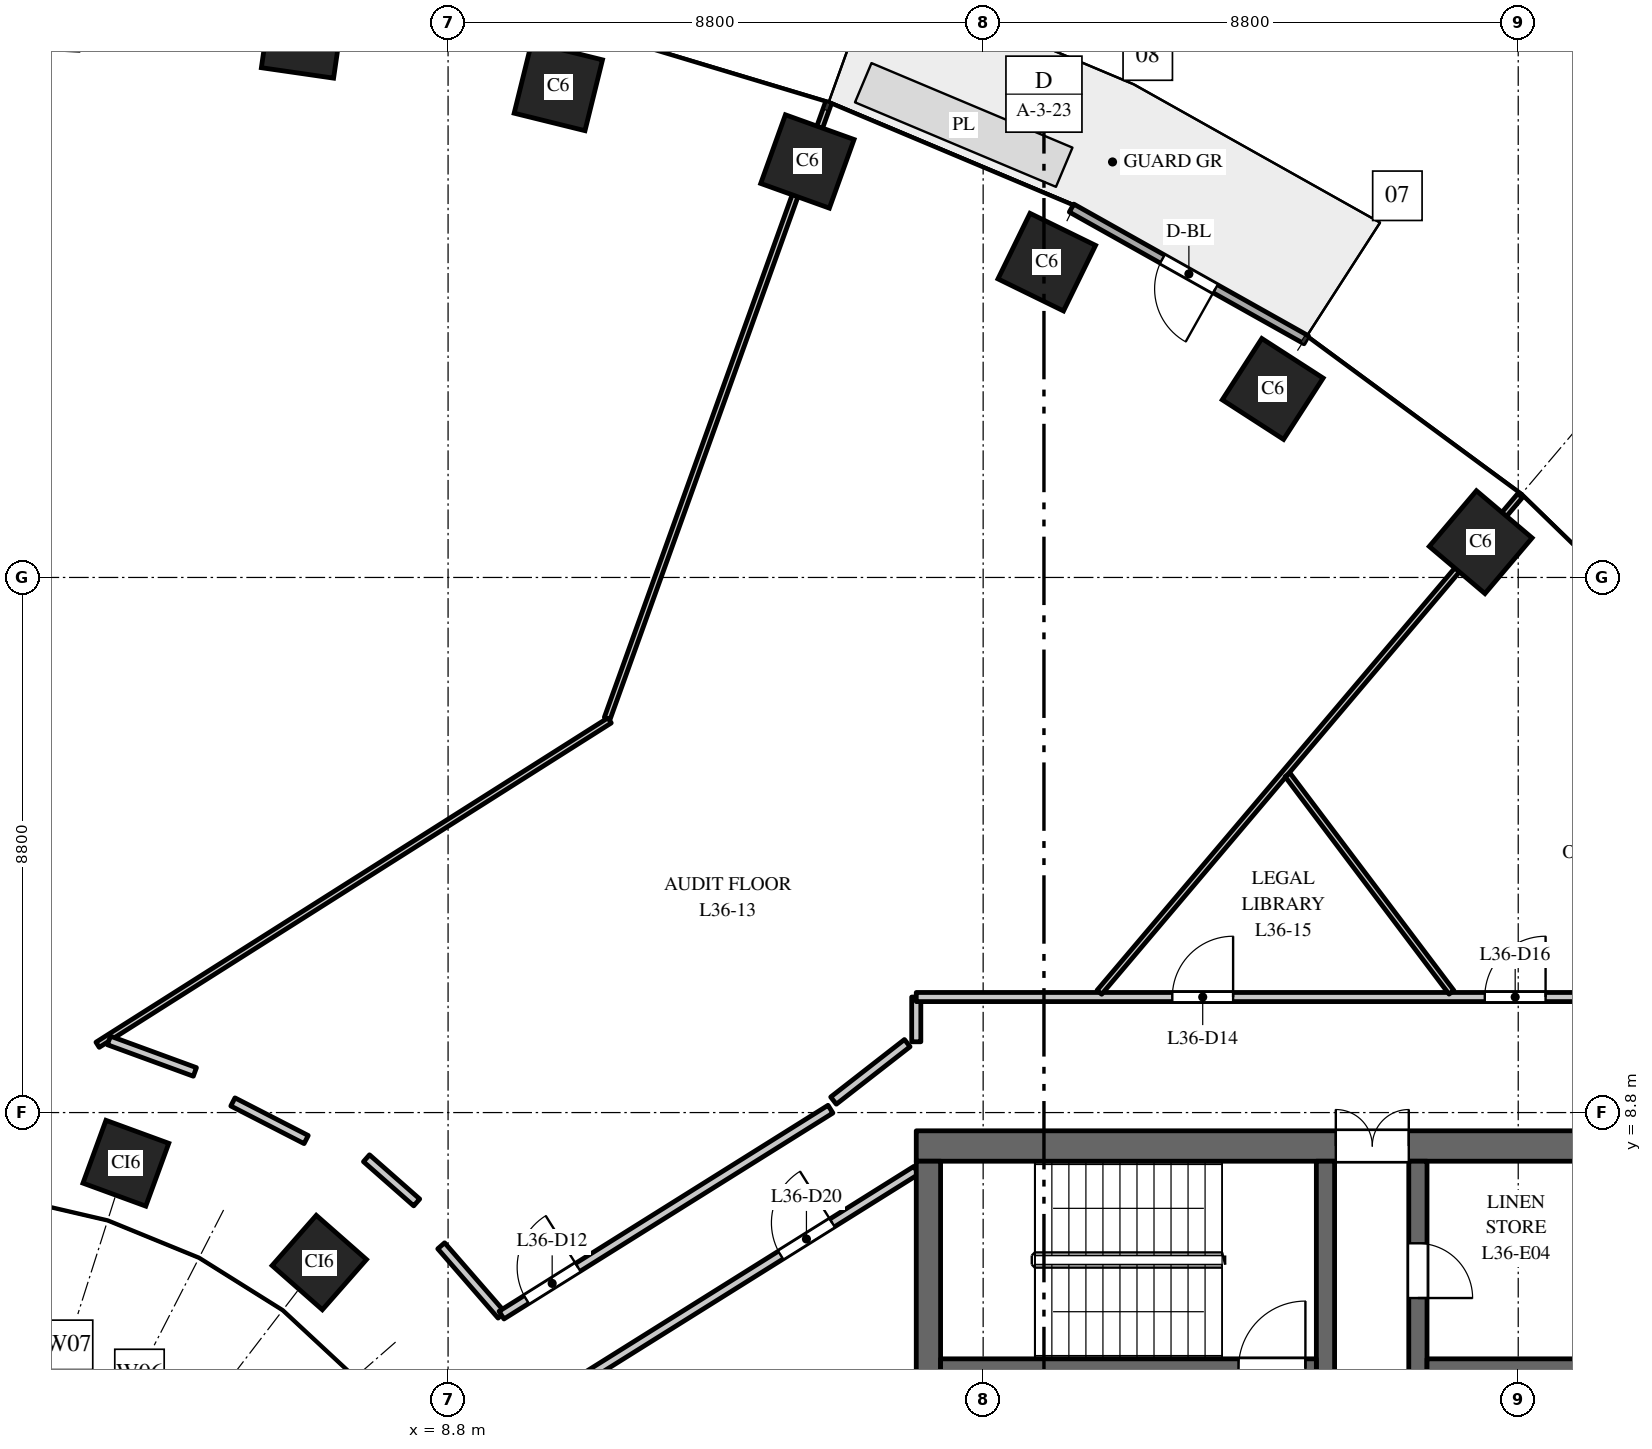
"""IFC4 building model, lengths in metres.
Left out: names, types, materials, properties, quantities, classifications, styles, units other than length and angle.
Written with IfcOpenShell. Run it as: python <this file> out.ifc"""

import sys

from ifc_helpers import new_model, si_unit, direction, frame, frame_2d, origin, origin_2d, place, context, subcontext, project, spatial, rectangle, extrude, element, fill, save


model = new_model("IFC4")
c1 = context("Model", 3, precision=1e-05, world=origin(), true_north=direction((0.0, 1.0)))
c2 = subcontext(c1, "Body", "Model", "MODEL_VIEW")
j1 = project(units=[si_unit("LENGTHUNIT", "METRE"), si_unit("PLANEANGLEUNIT", "RADIAN")], contexts=[c1])
p1 = place(None, origin())
s1 = spatial("IfcSite", under=j1, at=p1, CompositionType="ELEMENT")
p2 = place(p1, origin())
s2 = spatial("IfcBuilding", under=s1, at=p2, CompositionType="ELEMENT")
p3 = place(p2, frame((0.0, 0.0, 158.0)))
s3 = spatial("IfcBuildingStorey", under=s2, at=p3, CompositionType="ELEMENT", Elevation=158.0)
for number, where, z_axis, x_axis in (
    (1, (25.783, 18.18, 0.0), (0.0, 0.0, 1.0), (-0.763, 0.646, 0.0)),
    (2, (22.362, 20.7, 0.0), (0.0, 0.0, 1.0), (-0.84, 0.542, 0.0)),
    (3, (18.646, 22.785, 0.0), (0.0, 0.0, 1.0), (-0.898, 0.439, 0.0)),
    (4, (14.709, 24.441, 0.0), (0.0, 0.0, 1.0), (-0.941, 0.338, 0.0)),
    (5, (10.613, 25.674, 0.0), (0.0, 0.0, 1.0), (-0.971, 0.24, 0.0)),
    (6, (6.409, 26.491, 0.0), (0.0, 0.0, 1.0), (-0.99, 0.143, 0.0)),
):
    element("IfcColumn", number, at=place(p3, frame(where, z_axis=z_axis, x_axis=x_axis)), inside=s3, PredefinedType="COLUMN", context=c2, shape_type="SweptSolid", body=[
        extrude(rectangle(XDim=1.2, YDim=1.2, at=origin_2d()), origin(), (0.0, 0.0, 1.0), 4.0),
    ])
for number, where, z_axis, x_axis in (
    (7, (6.682, 6.334, 0.0), (0.0, 0.0, 1.0), (-0.751, 0.66, 0.0)),
    (8, (3.501, 7.967, 0.0), (0.0, 0.0, 1.0), (-0.939, 0.344, 0.0)),
):
    element("IfcColumn", number, at=place(p3, frame(where, z_axis=z_axis, x_axis=x_axis)), inside=s3, PredefinedType="COLUMN", context=c2, shape_type="SweptSolid", body=[
        extrude(rectangle(XDim=1.1, YDim=1.1, at=origin_2d()), origin(), (0.0, 0.0, 1.0), 4.0),
    ])
p4 = place(p3, frame((16.5, 8.25, 0.0), z_axis=(0.0, 0.0, 1.0), x_axis=(1.0, 0.0, 0.0)))
e9 = element("IfcWall", 9, at=p4, inside=s3, PredefinedType="SHEAR", context=c2, shape_type="SweptSolid", body=[
    extrude(rectangle(XDim=15.0, YDim=0.5, at=frame_2d((7.5, 0.0))), origin(), (0.0, 0.0, 1.0), 3.7),
])
p5 = place(p4, frame((6.9, 0.0, 0.0)))
e10 = element("IfcOpeningElement", 10, at=p5, cuts=e9, PredefinedType="OPENING", context=c2, shape_type="SweptSolid", body=[
    extrude(rectangle(XDim=1.2, YDim=2.1, at=frame_2d((0.6, 1.05))), frame((0.0, 0.26, 0.0), z_axis=(0.0, -1.0, 0.0), x_axis=(1.0, 0.0, 0.0)), (0.0, 0.0, 1.0), 0.52),
])
p6 = place(p4, frame((12.425, 0.0, 0.0)))
e11 = element("IfcOpeningElement", 11, at=p6, cuts=e9, PredefinedType="OPENING", context=c2, shape_type="SweptSolid", body=[
    extrude(rectangle(XDim=0.9, YDim=2.1, at=frame_2d((0.45, 1.05))), frame((0.0, 0.26, 0.0), z_axis=(0.0, -1.0, 0.0), x_axis=(1.0, 0.0, 0.0)), (0.0, 0.0, 1.0), 0.52),
])
p7 = place(p3, frame((24.75, -8.0, 0.0), z_axis=(0.0, 0.0, 1.0), x_axis=(0.0, 1.0, 0.0)))
e12 = element("IfcWall", 12, at=p7, inside=s3, PredefinedType="SHEAR", context=c2, shape_type="SweptSolid", body=[
    extrude(rectangle(XDim=16.0, YDim=0.3, at=frame_2d((8.0, 0.0))), origin(), (0.0, 0.0, 1.0), 3.7),
])
p8 = place(p7, frame((4.425, 0.0, 0.0)))
e13 = element("IfcOpeningElement", 13, at=p8, cuts=e12, PredefinedType="OPENING", context=c2, shape_type="SweptSolid", body=[
    extrude(rectangle(XDim=1.1, YDim=2.1, at=frame_2d((0.55, 1.05))), frame((0.0, 0.16, 0.0), z_axis=(0.0, -1.0, 0.0), x_axis=(1.0, 0.0, 0.0)), (0.0, 0.0, 1.0), 0.32),
])
p9 = place(p7, frame((7.45, 0.0, 0.0)))
e14 = element("IfcOpeningElement", 14, at=p9, cuts=e12, PredefinedType="OPENING", context=c2, shape_type="SweptSolid", body=[
    extrude(rectangle(XDim=1.1, YDim=2.1, at=frame_2d((0.55, 1.05))), frame((0.0, 0.16, 0.0), z_axis=(0.0, -1.0, 0.0), x_axis=(1.0, 0.0, 0.0)), (0.0, 0.0, 1.0), 0.32),
])
p10 = place(p7, frame((10.475, 0.0, 0.0)))
e15 = element("IfcOpeningElement", 15, at=p10, cuts=e12, PredefinedType="OPENING", context=c2, shape_type="SweptSolid", body=[
    extrude(rectangle(XDim=1.1, YDim=2.1, at=frame_2d((0.55, 1.05))), frame((0.0, 0.16, 0.0), z_axis=(0.0, -1.0, 0.0), x_axis=(1.0, 0.0, 0.0)), (0.0, 0.0, 1.0), 0.32),
])
p11 = place(p7, frame((13.75, 0.0, 0.0)))
e16 = element("IfcOpeningElement", 16, at=p11, cuts=e12, PredefinedType="OPENING", context=c2, shape_type="SweptSolid", body=[
    extrude(rectangle(XDim=0.9, YDim=2.1, at=frame_2d((0.45, 1.05))), frame((0.0, 0.16, 0.0), z_axis=(0.0, -1.0, 0.0), x_axis=(1.0, 0.0, 0.0)), (0.0, 0.0, 1.0), 0.32),
])
p12 = place(p7, frame((1.35, 0.0, 0.0)))
e17 = element("IfcOpeningElement", 17, at=p12, cuts=e12, PredefinedType="OPENING", context=c2, shape_type="SweptSolid", body=[
    extrude(rectangle(XDim=0.9, YDim=2.1, at=frame_2d((0.45, 1.05))), frame((0.0, 0.16, 0.0), z_axis=(0.0, -1.0, 0.0), x_axis=(1.0, 0.0, 0.0)), (0.0, 0.0, 1.0), 0.32),
])
p13 = place(p3, frame((16.7, -8.0, 0.0), z_axis=(0.0, 0.0, 1.0), x_axis=(0.0, 1.0, 0.0)))
e18 = element("IfcWall", 18, at=p13, inside=s3, PredefinedType="SHEAR", context=c2, shape_type="SweptSolid", body=[
    extrude(rectangle(XDim=16.0, YDim=0.4, at=frame_2d((8.0, 0.0))), origin(), (0.0, 0.0, 1.0), 3.7),
])
p14 = place(p3, frame((24.9, 4.6, 0.0), z_axis=(0.0, 0.0, 1.0), x_axis=(1.0, 0.0, 0.0)))
e19 = element("IfcWall", 19, at=p14, inside=s3, PredefinedType="SHEAR", context=c2, shape_type="SweptSolid", body=[
    extrude(rectangle(XDim=6.1, YDim=0.3, at=frame_2d((3.05, 0.0))), origin(), (0.0, 0.0, 1.0), 3.7),
])
p15 = place(p14, frame((4.2, 0.0, 0.0)))
e20 = element("IfcOpeningElement", 20, at=p15, cuts=e19, PredefinedType="OPENING", context=c2, shape_type="SweptSolid", body=[
    extrude(rectangle(XDim=0.9, YDim=2.1, at=frame_2d((0.45, 1.05))), frame((0.0, 0.16, 0.0), z_axis=(0.0, -1.0, 0.0), x_axis=(1.0, 0.0, 0.0)), (0.0, 0.0, 1.0), 0.32),
])
p16 = place(p3, frame((23.23, 2.25, 0.0), z_axis=(0.0, 0.0, 1.0), x_axis=(0.0, 1.0, 0.0)))
e21 = element("IfcWall", 21, at=p16, inside=s3, PredefinedType="SHEAR", context=c2, shape_type="SweptSolid", body=[
    extrude(rectangle(XDim=5.75, YDim=0.3, at=frame_2d((2.875, 0.0))), origin(), (0.0, 0.0, 1.0), 3.7),
])
p17 = place(p16, frame((0.6, 0.0, 0.0)))
e22 = element("IfcOpeningElement", 22, at=p17, cuts=e21, PredefinedType="OPENING", context=c2, shape_type="SweptSolid", body=[
    extrude(rectangle(XDim=1.0, YDim=2.1, at=frame_2d((0.5, 1.05))), frame((0.0, 0.16, 0.0), z_axis=(0.0, -1.0, 0.0), x_axis=(1.0, 0.0, 0.0)), (0.0, 0.0, 1.0), 0.32),
])
p18 = place(p3, frame((16.9, 4.6, 0.0), z_axis=(0.0, 0.0, 1.0), x_axis=(1.0, 0.0, 0.0)))
e23 = element("IfcWall", 23, at=p18, inside=s3, PredefinedType="SHEAR", context=c2, shape_type="SweptSolid", body=[
    extrude(rectangle(XDim=6.18, YDim=0.3, at=frame_2d((3.09, 0.0))), origin(), (0.0, 0.0, 1.0), 3.7),
])
p19 = place(p18, frame((4.9, 0.0, 0.0)))
e24 = element("IfcOpeningElement", 24, at=p19, cuts=e23, PredefinedType="OPENING", context=c2, shape_type="SweptSolid", body=[
    extrude(rectangle(XDim=1.1, YDim=2.1, at=frame_2d((0.55, 1.05))), frame((0.0, 0.16, 0.0), z_axis=(0.0, -1.0, 0.0), x_axis=(1.0, 0.0, 0.0)), (0.0, 0.0, 1.0), 0.32),
])
p20 = place(p3, frame((22.913, 21.509, 0.0), z_axis=(0.0, 0.0, 1.0), x_axis=(-0.872046572975, 0.489422899509, 0.0)))
e25 = element("IfcWall", 25, at=p20, inside=s3, PredefinedType="STANDARD", context=c2, shape_type="SweptSolid", body=[
    extrude(rectangle(XDim=4.426, YDim=0.15, at=frame_2d((2.213, 0.0))), origin(), (0.0, 0.0, 1.0), 3.7),
])
p21 = place(p20, frame((1.713, 0.0, 0.0)))
e26 = element("IfcOpeningElement", 26, at=p21, cuts=e25, PredefinedType="OPENING", context=c2, shape_type="SweptSolid", body=[
    extrude(rectangle(XDim=1.0, YDim=2.4, at=frame_2d((0.5, 1.2))), frame((0.0, 0.085, 0.0), z_axis=(0.0, -1.0, 0.0), x_axis=(1.0, 0.0, 0.0)), (0.0, 0.0, 1.0), 0.17),
])
p22 = place(p3, frame((3.036, 9.915, 0.0), z_axis=(0.0, 0.0, 1.0), x_axis=(0.844792135558, 0.535094615652, 0.0)))
e27 = element("IfcWall", 27, at=p22, inside=s3, PredefinedType="PARTITIONING", context=c2, shape_type="SweptSolid", body=[
    extrude(rectangle(XDim=9.968, YDim=0.1, at=frame_2d((4.984, 0.0))), origin(), (0.0, 0.0, 1.0), 2.85),
])
p23 = place(p3, frame((3.222, 9.986, 0.0), z_axis=(0.0, 0.0, 1.0), x_axis=(0.938967105432, -0.344006940215, 0.0)))
e28 = element("IfcWall", 28, at=p23, inside=s3, PredefinedType="PARTITIONING", context=c2, shape_type="SweptSolid", body=[
    extrude(rectangle(XDim=1.506, YDim=0.15, at=frame_2d((0.753, 0.0))), origin(), (0.0, 0.0, 1.0), 3.7),
])
p24 = place(p3, frame((5.261, 8.975, 0.0), z_axis=(0.0, 0.0, 1.0), x_axis=(0.889472002788, -0.456989667559, 0.0)))
e29 = element("IfcWall", 29, at=p24, inside=s3, PredefinedType="PARTITIONING", context=c2, shape_type="SweptSolid", body=[
    extrude(rectangle(XDim=1.355, YDim=0.15, at=frame_2d((0.677, 0.0))), origin(), (0.0, 0.0, 1.0), 2.85),
])
p25 = place(p3, frame((7.458, 8.049, 0.0), z_axis=(0.0, 0.0, 1.0), x_axis=(0.75060787095, -0.660747927782, 0.0)))
e30 = element("IfcWall", 30, at=p25, inside=s3, PredefinedType="PARTITIONING", context=c2, shape_type="SweptSolid", body=[
    extrude(rectangle(XDim=1.1, YDim=0.15, at=frame_2d((0.55, 0.0))), origin(), (0.0, 0.0, 1.0), 3.7),
])
p26 = place(p3, frame((8.687, 6.609, 0.0), z_axis=(0.0, 0.0, 1.0), x_axis=(0.656454677423, -0.75436546613, 0.0)))
e31 = element("IfcWall", 31, at=p26, inside=s3, PredefinedType="PARTITIONING", context=c2, shape_type="SweptSolid", body=[
    extrude(rectangle(XDim=1.511, YDim=0.15, at=frame_2d((0.755, 0.0))), origin(), (0.0, 0.0, 1.0), 3.7),
])
p27 = place(p3, frame((9.679, 5.469, 0.0), z_axis=(0.0, 0.0, 1.0), x_axis=(0.847602682855, 0.530631408811, 0.0)))
e32 = element("IfcWall", 32, at=p27, inside=s3, PredefinedType="PARTITIONING", context=c2, shape_type="SweptSolid", body=[
    extrude(rectangle(XDim=6.383, YDim=0.15, at=frame_2d((3.191, 0.0))), origin(), (0.0, 0.0, 1.0), 3.7),
])
p28 = place(p27, frame((0.483, 0.0, 0.0)))
e33 = element("IfcOpeningElement", 33, at=p28, cuts=e32, PredefinedType="OPENING", context=c2, shape_type="SweptSolid", body=[
    extrude(rectangle(XDim=1.0, YDim=2.1, at=frame_2d((0.5, 1.05))), frame((0.0, 0.085, 0.0), z_axis=(0.0, -1.0, 0.0), x_axis=(1.0, 0.0, 0.0)), (0.0, 0.0, 1.0), 0.17),
])
p29 = place(p3, frame((10.752, 4.254, 0.0), z_axis=(0.0, 0.0, 1.0), x_axis=(0.847690706888, 0.530490777917, 0.0)))
e34 = element("IfcWall", 34, at=p29, inside=s3, PredefinedType="PARTITIONING", context=c2, shape_type="SweptSolid", body=[
    extrude(rectangle(XDim=6.781, YDim=0.15, at=frame_2d((3.39, 0.0))), origin(), (0.0, 0.0, 1.0), 3.7),
])
p30 = place(p29, frame((4.15, 0.0, 0.0)))
e35 = element("IfcOpeningElement", 35, at=p30, cuts=e34, PredefinedType="OPENING", context=c2, shape_type="SweptSolid", body=[
    extrude(rectangle(XDim=1.0, YDim=2.1, at=frame_2d((0.5, 1.05))), frame((0.0, 0.085, 0.0), z_axis=(0.0, -1.0, 0.0), x_axis=(1.0, 0.0, 0.0)), (0.0, 0.0, 1.0), 0.17),
])
p31 = place(p3, frame((11.417, 15.282, 0.0), z_axis=(0.0, 0.0, 1.0), x_axis=(0.338283704349, 0.941044172912, 0.0)))
e36 = element("IfcWall", 36, at=p31, inside=s3, PredefinedType="PARTITIONING", context=c2, shape_type="SweptSolid", body=[
    extrude(rectangle(XDim=10.734, YDim=0.1, at=frame_2d((5.367, 0.0))), origin(), (0.0, 0.0, 1.0), 2.85),
])
p32 = place(p3, frame((16.5, 9.964, 0.0), z_axis=(0.0, 0.0, 1.0), x_axis=(0.0, 1.0, 0.0)))
e37 = element("IfcWall", 37, at=p32, inside=s3, PredefinedType="PARTITIONING", context=c2, shape_type="SweptSolid", body=[
    extrude(rectangle(XDim=0.736, YDim=0.15, at=frame_2d((0.368, 0.0))), origin(), (0.0, 0.0, 1.0), 3.7),
])
p33 = place(p3, frame((16.5, 10.7, 0.0), z_axis=(0.0, 0.0, 1.0), x_axis=(1.0, 0.0, 0.0)))
e38 = element("IfcWall", 38, at=p33, inside=s3, PredefinedType="PARTITIONING", context=c2, shape_type="SweptSolid", body=[
    extrude(rectangle(XDim=15.0, YDim=0.15, at=frame_2d((7.5, 0.0))), origin(), (0.0, 0.0, 1.0), 2.75),
])
p34 = place(p33, frame((4.211, 0.0, 0.0)))
e39 = element("IfcOpeningElement", 39, at=p34, cuts=e38, PredefinedType="OPENING", context=c2, shape_type="SweptSolid", body=[
    extrude(rectangle(XDim=1.0, YDim=2.1, at=frame_2d((0.5, 1.05))), frame((0.0, 0.085, 0.0), z_axis=(0.0, -1.0, 0.0), x_axis=(1.0, 0.0, 0.0)), (0.0, 0.0, 1.0), 0.17),
])
p35 = place(p33, frame((9.35, 0.0, 0.0)))
e40 = element("IfcOpeningElement", 40, at=p35, cuts=e38, PredefinedType="OPENING", context=c2, shape_type="SweptSolid", body=[
    extrude(rectangle(XDim=1.0, YDim=2.1, at=frame_2d((0.5, 1.05))), frame((0.0, 0.085, 0.0), z_axis=(0.0, -1.0, 0.0), x_axis=(1.0, 0.0, 0.0)), (0.0, 0.0, 1.0), 0.17),
])
p36 = place(p3, frame((19.511, 10.778, 0.0), z_axis=(0.0, 0.0, 1.0), x_axis=(0.646400187952, 0.762998556365, 0.0)))
e41 = element("IfcWall", 41, at=p36, inside=s3, PredefinedType="PARTITIONING", context=c2, shape_type="SweptSolid", body=[
    extrude(rectangle(XDim=10.704, YDim=0.1, at=frame_2d((5.352, 0.0))), origin(), (0.0, 0.0, 1.0), 2.9),
])
p37 = place(p3, frame((22.606, 14.354, 0.0), z_axis=(0.0, 0.0, 1.0), x_axis=(0.602012984229, -0.798486297202, 0.0)))
e42 = element("IfcWall", 42, at=p37, inside=s3, PredefinedType="PARTITIONING", context=c2, shape_type="SweptSolid", body=[
    extrude(rectangle(XDim=4.478, YDim=0.1, at=frame_2d((2.239, 0.0))), origin(), (0.0, 0.0, 1.0), 2.75),
])
p38 = place(p3, frame((15.139, 8.997, 0.0), z_axis=(0.0, 0.0, 1.0), x_axis=(0.788950226826, 0.614457109643, 0.0)))
e43 = element("IfcWall", 43, at=p38, inside=s3, PredefinedType="PARTITIONING", context=c2, shape_type="SweptSolid", body=[
    extrude(rectangle(XDim=1.538, YDim=0.15, at=frame_2d((0.769, 0.0))), origin(), (0.0, 0.0, 1.0), 3.7),
])
p39 = place(p19, origin())
e44 = element("IfcDoor", 44, at=p39, inside=s3, OperationType="SINGLE_SWING_LEFT", PredefinedType="DOOR", context=c2, shape_type="SweptSolid", body=[
    extrude(rectangle(XDim=1.1, YDim=2.1, at=frame_2d((0.55, 1.05))), frame((0.0, 0.025, 0.0), z_axis=(0.0, -1.0, 0.0), x_axis=(1.0, 0.0, 0.0)), (0.0, 0.0, 1.0), 0.05),
])
fill(e24, e44)
p40 = place(p5, origin())
e45 = element("IfcDoor", 45, at=p40, inside=s3, OperationType="DOUBLE_DOOR_DOUBLE_SWING", PredefinedType="DOOR", context=c2, shape_type="SweptSolid", body=[
    extrude(rectangle(XDim=1.2, YDim=2.1, at=frame_2d((0.6, 1.05))), frame((0.0, 0.025, 0.0), z_axis=(0.0, -1.0, 0.0), x_axis=(1.0, 0.0, 0.0)), (0.0, 0.0, 1.0), 0.05),
])
fill(e10, e45)
p41 = place(p11, origin())
e46 = element("IfcDoor", 46, at=p41, inside=s3, OperationType="SINGLE_SWING_LEFT", PredefinedType="DOOR", context=c2, shape_type="SweptSolid", body=[
    extrude(rectangle(XDim=0.9, YDim=2.1, at=frame_2d((0.45, 1.05))), frame((0.0, 0.025, 0.0), z_axis=(0.0, -1.0, 0.0), x_axis=(1.0, 0.0, 0.0)), (0.0, 0.0, 1.0), 0.05),
])
fill(e16, e46)
p42 = place(p21, origin())
e47 = element("IfcDoor", 47, at=p42, inside=s3, OperationType="SINGLE_SWING_LEFT", PredefinedType="DOOR", context=c2, shape_type="SweptSolid", body=[
    extrude(rectangle(XDim=1.0, YDim=2.4, at=frame_2d((0.5, 1.2))), frame((0.0, 0.025, 0.0), z_axis=(0.0, -1.0, 0.0), x_axis=(1.0, 0.0, 0.0)), (0.0, 0.0, 1.0), 0.05),
])
fill(e26, e47)
p43 = place(p28, origin())
e48 = element("IfcDoor", 48, at=p43, inside=s3, OperationType="SINGLE_SWING_RIGHT", PredefinedType="DOOR", context=c2, shape_type="SweptSolid", body=[
    extrude(rectangle(XDim=1.0, YDim=2.1, at=frame_2d((0.5, 1.05))), frame((0.0, 0.025, 0.0), z_axis=(0.0, -1.0, 0.0), x_axis=(1.0, 0.0, 0.0)), (0.0, 0.0, 1.0), 0.05),
])
fill(e33, e48)
p44 = place(p34, origin())
e49 = element("IfcDoor", 49, at=p44, inside=s3, OperationType="SINGLE_SWING_RIGHT", PredefinedType="DOOR", context=c2, shape_type="SweptSolid", body=[
    extrude(rectangle(XDim=1.0, YDim=2.1, at=frame_2d((0.5, 1.05))), frame((0.0, 0.025, 0.0), z_axis=(0.0, -1.0, 0.0), x_axis=(1.0, 0.0, 0.0)), (0.0, 0.0, 1.0), 0.05),
])
fill(e39, e49)
p45 = place(p35, origin())
e50 = element("IfcDoor", 50, at=p45, inside=s3, OperationType="SINGLE_SWING_RIGHT", PredefinedType="DOOR", context=c2, shape_type="SweptSolid", body=[
    extrude(rectangle(XDim=1.0, YDim=2.1, at=frame_2d((0.5, 1.05))), frame((0.0, 0.025, 0.0), z_axis=(0.0, -1.0, 0.0), x_axis=(1.0, 0.0, 0.0)), (0.0, 0.0, 1.0), 0.05),
])
fill(e40, e50)
p46 = place(p30, origin())
e51 = element("IfcDoor", 51, at=p46, inside=s3, OperationType="SINGLE_SWING_RIGHT", PredefinedType="DOOR", context=c2, shape_type="SweptSolid", body=[
    extrude(rectangle(XDim=1.0, YDim=2.1, at=frame_2d((0.5, 1.05))), frame((0.0, 0.025, 0.0), z_axis=(0.0, -1.0, 0.0), x_axis=(1.0, 0.0, 0.0)), (0.0, 0.0, 1.0), 0.05),
])
fill(e35, e51)
save(model, sys.argv[1])
